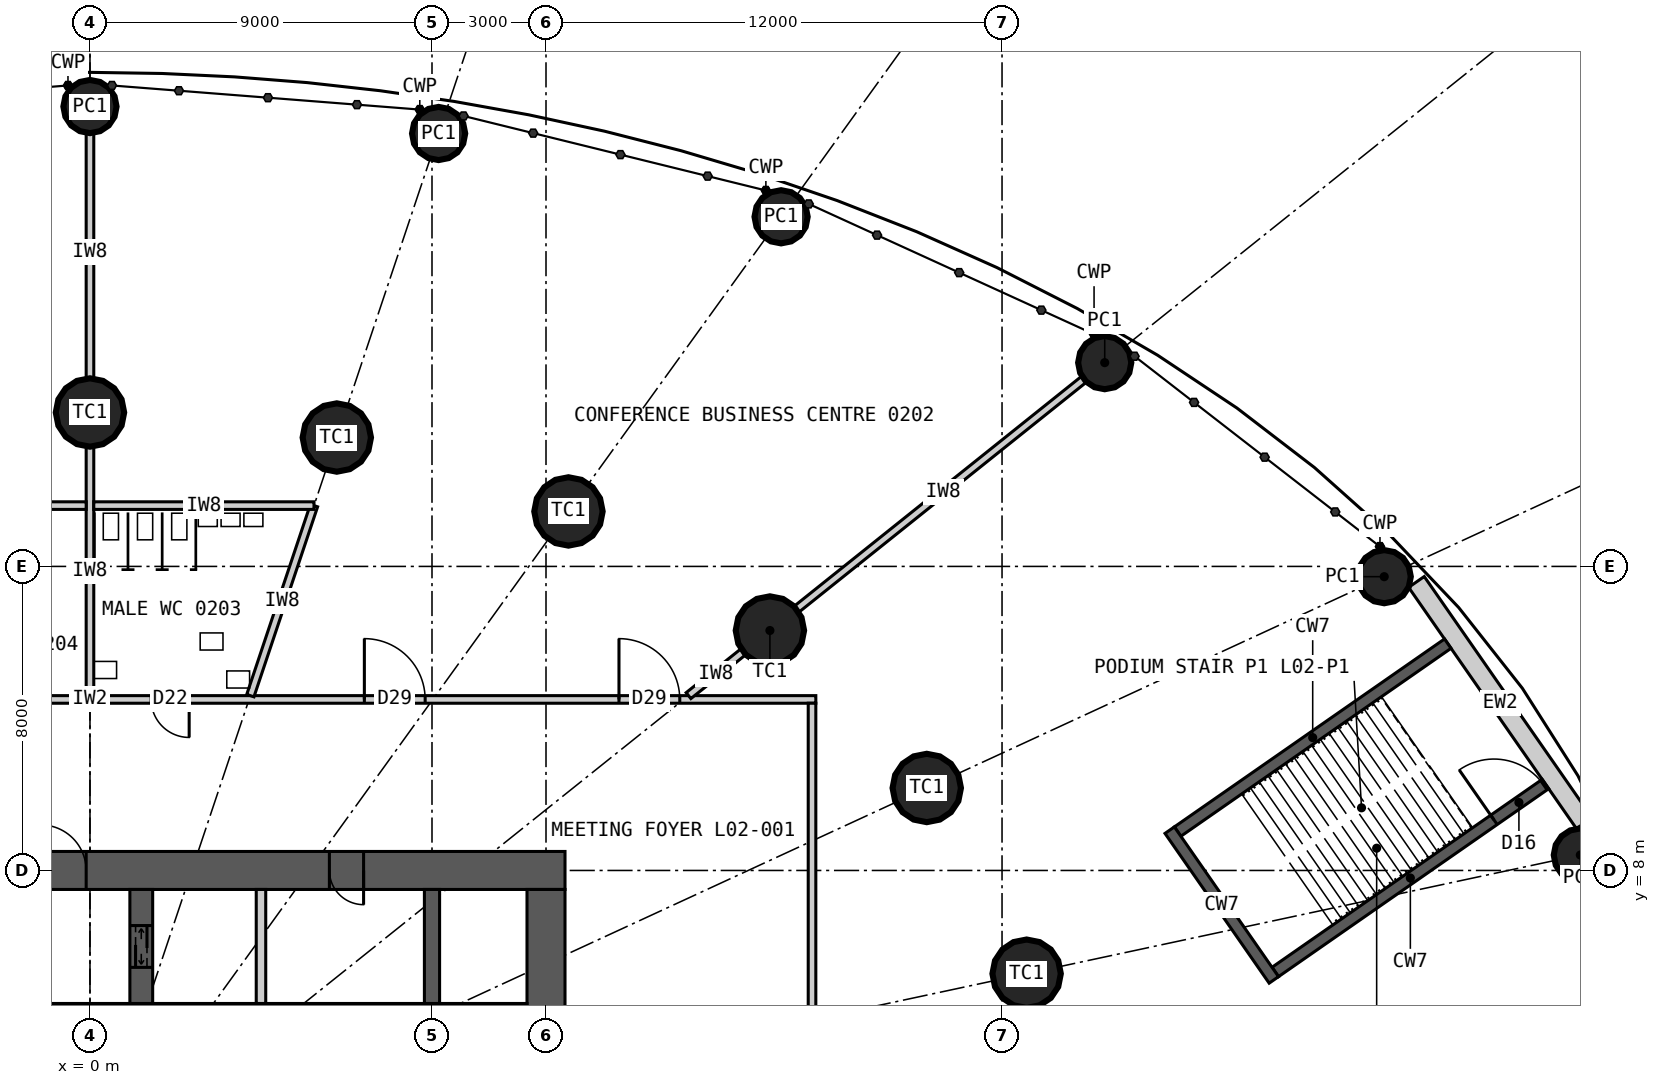
"""IFC4 building model, lengths in metres.
Left out: names, types, materials, properties, quantities, classifications, styles, units other than length and angle.
Written with IfcOpenShell. Run it as: python <this file> out.ifc"""

import sys

from ifc_helpers import new_model, si_unit, direction, frame, frame_2d, origin, origin_2d, place, context, subcontext, project, spatial, rectangle, circle, extrude, element, fill, save


model = new_model("IFC4")
c1 = context("Model", 3, precision=1e-05, world=origin(), true_north=direction((0.0, 1.0)))
c2 = subcontext(c1, "Body", "Model", "MODEL_VIEW")
j1 = project(units=[si_unit("LENGTHUNIT", "METRE"), si_unit("PLANEANGLEUNIT", "RADIAN")], contexts=[c1])
p1 = place(None, origin())
s1 = spatial("IfcSite", under=j1, at=p1, CompositionType="ELEMENT")
p2 = place(p1, origin())
s2 = spatial("IfcBuilding", under=s1, at=p2, CompositionType="ELEMENT")
p3 = place(p2, frame((0.0, 0.0, 13.8)))
s3 = spatial("IfcBuildingStorey", under=s2, at=p3, CompositionType="ELEMENT", Elevation=13.8)
for number, where, z_axis, x_axis in (
    (1, (24.647, 5.283, 0.0), (0.0, 0.0, 1.0), (1.0, 0.0, 0.0)),
    (2, (22.019, 10.17, 0.0), (0.0, 0.0, 1.0), (1.0, 0.0, 0.0)),
    (3, (17.892, 14.313, 0.0), (0.0, 0.0, 1.0), (1.0, 0.0, 0.0)),
    (4, (12.591, 17.447, 0.0), (0.0, 0.0, 1.0), (1.0, 0.0, 0.0)),
    (5, (6.495, 19.391, 0.0), (0.0, 0.0, 1.0), (1.0, 0.0, 0.0)),
    (6, (0.0, 20.05, 0.0), (0.0, 0.0, 1.0), (1.0, 0.0, 0.0)),
):
    element("IfcColumn", number, at=place(p3, frame(where, z_axis=z_axis, x_axis=x_axis)), inside=s3, PredefinedType="COLUMN", context=c2, shape_type="SweptSolid", body=[
        extrude(circle(Radius=0.9, at=origin_2d()), origin(), (0.0, 0.0, 1.0), 5.4),
    ])
for number, where, z_axis, x_axis in (
    (7, (39.218, 8.407, 0.0), (0.0, 0.0, 1.0), (1.0, 0.0, 0.0)),
    (8, (34.057, 15.73, 0.0), (0.0, 0.0, 1.0), (1.0, 0.0, 0.0)),
    (9, (26.702, 21.362, 0.0), (0.0, 0.0, 1.0), (1.0, 0.0, 0.0)),
    (10, (18.186, 25.199, 0.0), (0.0, 0.0, 1.0), (1.0, 0.0, 0.0)),
    (11, (9.174, 27.391, 0.0), (0.0, 0.0, 1.0), (1.0, 0.0, 0.0)),
    (12, (0.0, 28.1, 0.0), (0.0, 0.0, 1.0), (1.0, 0.0, 0.0)),
):
    element("IfcColumn", number, at=place(p3, frame(where, z_axis=z_axis, x_axis=x_axis)), inside=s3, PredefinedType="COLUMN", context=c2, shape_type="SweptSolid", body=[
        extrude(circle(Radius=0.7, at=origin_2d()), origin(), (0.0, 0.0, 1.0), 5.4),
    ])
p4 = place(p3, frame((-12.5, 8.0, 0.0), z_axis=(0.0, 0.0, 1.0), x_axis=(1.0, 0.0, 0.0)))
e13 = element("IfcWall", 13, at=p4, inside=s3, PredefinedType="SHEAR", context=c2, shape_type="SweptSolid", body=[
    extrude(rectangle(XDim=25.0, YDim=1.0, at=frame_2d((12.5, 0.0))), origin(), (0.0, 0.0, 1.0), 5.4),
])
p5 = place(p4, frame((11.2, 0.0, 0.0)))
e14 = element("IfcOpeningElement", 14, at=p5, cuts=e13, PredefinedType="OPENING", context=c2, shape_type="SweptSolid", body=[
    extrude(rectangle(XDim=1.2, YDim=2.2, at=frame_2d((0.6, 1.1))), frame((0.0, 0.51, 0.0), z_axis=(0.0, -1.0, 0.0), x_axis=(1.0, 0.0, 0.0)), (0.0, 0.0, 1.0), 1.02),
])
p6 = place(p4, frame((18.8, 0.0, 0.0)))
e15 = element("IfcOpeningElement", 15, at=p6, cuts=e13, PredefinedType="OPENING", context=c2, shape_type="SweptSolid", body=[
    extrude(rectangle(XDim=0.9, YDim=2.2, at=frame_2d((0.45, 1.1))), frame((0.0, 0.51, 0.0), z_axis=(0.0, -1.0, 0.0), x_axis=(1.0, 0.0, 0.0)), (0.0, 0.0, 1.0), 1.02),
])
p7 = place(p3, frame((12.0, -7.5, 0.0), z_axis=(0.0, 0.0, 1.0), x_axis=(0.0, 1.0, 0.0)))
e16 = element("IfcWall", 16, at=p7, inside=s3, PredefinedType="SHEAR", context=c2, shape_type="SweptSolid", body=[
    extrude(rectangle(XDim=15.0, YDim=1.0, at=frame_2d((7.5, 0.0))), origin(), (0.0, 0.0, 1.0), 5.4),
])
p8 = place(p7, frame((6.6, 0.0, 0.0)))
e17 = element("IfcOpeningElement", 17, at=p8, cuts=e16, PredefinedType="OPENING", context=c2, shape_type="SweptSolid", body=[
    extrude(rectangle(XDim=1.8, YDim=2.2, at=frame_2d((0.9, 1.1))), frame((0.0, 0.51, 0.0), z_axis=(0.0, -1.0, 0.0), x_axis=(1.0, 0.0, 0.0)), (0.0, 0.0, 1.0), 1.02),
])
p9 = place(p3, frame((-11.5, 4.3, 0.0), z_axis=(0.0, 0.0, 1.0), x_axis=(1.0, 0.0, 0.0)))
e18 = element("IfcWall", 18, at=p9, inside=s3, PredefinedType="SHEAR", context=c2, shape_type="SweptSolid", body=[
    extrude(rectangle(XDim=23.0, YDim=0.4, at=frame_2d((11.5, 0.0))), origin(), (0.0, 0.0, 1.0), 5.4),
])
p10 = place(p3, frame((9.0, 4.5, 0.0), z_axis=(0.0, 0.0, 1.0), x_axis=(0.0, 1.0, 0.0)))
e19 = element("IfcWall", 19, at=p10, inside=s3, PredefinedType="SHEAR", context=c2, shape_type="SweptSolid", body=[
    extrude(rectangle(XDim=3.0, YDim=0.4, at=frame_2d((1.5, 0.0))), origin(), (0.0, 0.0, 1.0), 5.4),
])
p11 = place(p3, frame((1.35, 4.5, 0.0), z_axis=(0.0, 0.0, 1.0), x_axis=(0.0, 1.0, 0.0)))
e20 = element("IfcWall", 20, at=p11, inside=s3, PredefinedType="SHEAR", context=c2, shape_type="SweptSolid", body=[
    extrude(rectangle(XDim=3.0, YDim=0.6, at=frame_2d((1.5, 0.0))), origin(), (0.0, 0.0, 1.0), 5.4),
])
p12 = place(p11, frame((0.95, 0.0, 0.0)))
e21 = element("IfcOpeningElement", 21, at=p12, cuts=e20, PredefinedType="OPENING", context=c2, shape_type="SweptSolid", body=[
    extrude(rectangle(XDim=1.1, YDim=2.2, at=frame_2d((0.55, 1.1))), frame((0.0, 0.31, 0.0), z_axis=(0.0, -1.0, 0.0), x_axis=(1.0, 0.0, 0.0)), (0.0, 0.0, 1.0), 0.62),
])
p13 = place(p3, frame((4.5, 4.5, 0.0), z_axis=(0.0, 0.0, 1.0), x_axis=(0.0, 1.0, 0.0)))
e22 = element("IfcWall", 22, at=p13, inside=s3, PredefinedType="PARTITIONING", context=c2, shape_type="SweptSolid", body=[
    extrude(rectangle(XDim=3.0, YDim=0.25, at=frame_2d((1.5, 0.0))), origin(), (0.0, 0.0, 1.0), 5.4),
])
p14 = place(p3, frame((39.32, 9.244, 0.0), z_axis=(0.0, 0.0, 1.0), x_axis=(-0.571029335057, 0.820929655028, 0.0)))
e23 = element("IfcWall", 23, at=p14, inside=s3, PredefinedType="SOLIDWALL", context=c2, shape_type="SweptSolid", body=[
    extrude(rectangle(XDim=7.733, YDim=0.5, at=frame_2d((3.866, 0.0))), origin(), (0.0, 0.0, 1.0), 5.15),
])
p15 = place(p3, frame((-19.1, 12.5, 0.0), z_axis=(0.0, 0.0, 1.0), x_axis=(1.0, 0.0, 0.0)))
e24 = element("IfcWall", 24, at=p15, inside=s3, PredefinedType="PARTITIONING", context=c2, shape_type="SweptSolid", body=[
    extrude(rectangle(XDim=38.2, YDim=0.2, at=frame_2d((19.1, 0.0))), origin(), (0.0, 0.0, 1.0), 5.15),
])
p16 = place(p15, frame((26.32, 0.0, 0.0)))
e25 = element("IfcOpeningElement", 25, at=p16, cuts=e24, PredefinedType="OPENING", context=c2, shape_type="SweptSolid", body=[
    extrude(rectangle(XDim=1.6, YDim=2.4, at=frame_2d((0.8, 1.2))), frame((0.0, 0.11, 0.0), z_axis=(0.0, -1.0, 0.0), x_axis=(1.0, 0.0, 0.0)), (0.0, 0.0, 1.0), 0.22),
])
p17 = place(p15, frame((20.71, 0.0, 0.0)))
e26 = element("IfcOpeningElement", 26, at=p17, cuts=e24, PredefinedType="OPENING", context=c2, shape_type="SweptSolid", body=[
    extrude(rectangle(XDim=1.0, YDim=2.1, at=frame_2d((0.5, 1.05))), frame((0.0, 0.11, 0.0), z_axis=(0.0, -1.0, 0.0), x_axis=(1.0, 0.0, 0.0)), (0.0, 0.0, 1.0), 0.22),
])
p18 = place(p15, frame((16.49, 0.0, 0.0)))
e27 = element("IfcOpeningElement", 27, at=p18, cuts=e24, PredefinedType="OPENING", context=c2, shape_type="SweptSolid", body=[
    extrude(rectangle(XDim=1.0, YDim=2.1, at=frame_2d((0.5, 1.05))), frame((0.0, 0.11, 0.0), z_axis=(0.0, -1.0, 0.0), x_axis=(1.0, 0.0, 0.0)), (0.0, 0.0, 1.0), 0.22),
])
p19 = place(p15, frame((11.943, 0.0, 0.0)))
e28 = element("IfcOpeningElement", 28, at=p19, cuts=e24, PredefinedType="OPENING", context=c2, shape_type="SweptSolid", body=[
    extrude(rectangle(XDim=1.0, YDim=2.2, at=frame_2d((0.5, 1.1))), frame((0.0, 0.11, 0.0), z_axis=(0.0, -1.0, 0.0), x_axis=(1.0, 0.0, 0.0)), (0.0, 0.0, 1.0), 0.22),
])
p20 = place(p15, frame((5.1, 0.0, 0.0)))
e29 = element("IfcOpeningElement", 29, at=p20, cuts=e24, PredefinedType="OPENING", context=c2, shape_type="SweptSolid", body=[
    extrude(rectangle(XDim=1.6, YDim=2.4, at=frame_2d((0.8, 1.2))), frame((0.0, 0.11, 0.0), z_axis=(0.0, -1.0, 0.0), x_axis=(1.0, 0.0, 0.0)), (0.0, 0.0, 1.0), 0.22),
])
p21 = place(p15, frame((33.02, 0.0, 0.0)))
e30 = element("IfcOpeningElement", 30, at=p21, cuts=e24, PredefinedType="OPENING", context=c2, shape_type="SweptSolid", body=[
    extrude(rectangle(XDim=1.6, YDim=2.4, at=frame_2d((0.8, 1.2))), frame((0.0, 0.11, 0.0), z_axis=(0.0, -1.0, 0.0), x_axis=(1.0, 0.0, 0.0)), (0.0, 0.0, 1.0), 0.22),
])
p22 = place(p3, frame((19.0, -12.4, 0.0), z_axis=(0.0, 0.0, 1.0), x_axis=(0.0, 1.0, 0.0)))
e31 = element("IfcWall", 31, at=p22, inside=s3, PredefinedType="PARTITIONING", context=c2, shape_type="SweptSolid", body=[
    extrude(rectangle(XDim=24.8, YDim=0.2, at=frame_2d((12.4, 0.0))), origin(), (0.0, 0.0, 1.0), 5.15),
])
p23 = place(p22, frame((11.5, 0.0, 0.0)))
e32 = element("IfcOpeningElement", 32, at=p23, cuts=e31, PredefinedType="OPENING", context=c2, shape_type="SweptSolid", body=[
    extrude(rectangle(XDim=1.8, YDim=2.4, at=frame_2d((0.9, 1.2))), frame((0.0, 0.11, 0.0), z_axis=(0.0, -1.0, 0.0), x_axis=(1.0, 0.0, 0.0)), (0.0, 0.0, 1.0), 0.22),
])
p24 = place(p3, frame((15.75, 12.6, 0.0), z_axis=(0.0, 0.0, 1.0), x_axis=(0.780881734892, 0.6246788904, 0.0)))
e33 = element("IfcWall", 33, at=p24, inside=s3, PredefinedType="PARTITIONING", context=c2, shape_type="SweptSolid", body=[
    extrude(rectangle(XDim=1.843, YDim=0.2, at=frame_2d((0.921, 0.0))), origin(), (0.0, 0.0, 1.0), 4.3),
])
p25 = place(p3, frame((18.594, 14.875, 0.0), z_axis=(0.0, 0.0, 1.0), x_axis=(0.780868809443, 0.624695047554, 0.0)))
e34 = element("IfcWall", 34, at=p25, inside=s3, PredefinedType="PARTITIONING", context=c2, shape_type="SweptSolid", body=[
    extrude(rectangle(XDim=9.883, YDim=0.2, at=frame_2d((4.941, 0.0))), origin(), (0.0, 0.0, 1.0), 4.25),
])
p26 = place(p3, frame((4.22, 12.6, 0.0), z_axis=(0.0, 0.0, 1.0), x_axis=(0.317574790206, 0.948233226915, 0.0)))
e35 = element("IfcWall", 35, at=p26, inside=s3, PredefinedType="PARTITIONING", context=c2, shape_type="SweptSolid", body=[
    extrude(rectangle(XDim=5.273, YDim=0.2, at=frame_2d((2.636, 0.0))), origin(), (0.0, 0.0, 1.0), 4.3),
])
p27 = place(p3, frame((0.0, 12.6, 0.0), z_axis=(0.0, 0.0, 1.0), x_axis=(0.0, 1.0, 0.0)))
e36 = element("IfcWall", 36, at=p27, inside=s3, PredefinedType="PARTITIONING", context=c2, shape_type="SweptSolid", body=[
    extrude(rectangle(XDim=6.55, YDim=0.2, at=frame_2d((3.275, 0.0))), origin(), (0.0, 0.0, 1.0), 4.3),
])
p28 = place(p3, frame((0.0, 20.95, 0.0), z_axis=(0.0, 0.0, 1.0), x_axis=(0.0, 1.0, 0.0)))
e37 = element("IfcWall", 37, at=p28, inside=s3, PredefinedType="PARTITIONING", context=c2, shape_type="SweptSolid", body=[
    extrude(rectangle(XDim=6.65, YDim=0.2, at=frame_2d((3.325, 0.0))), origin(), (0.0, 0.0, 1.0), 4.25),
])
p29 = place(p3, frame((38.299, 10.274, 0.0), z_axis=(0.0, 0.0, 1.0), x_axis=(-0.820936803751, -0.571019057692, 0.0)))
e38 = element("IfcWall", 38, at=p29, inside=s3, PredefinedType="SHEAR", context=c2, shape_type="SweptSolid", body=[
    extrude(rectangle(XDim=8.66, YDim=0.3, at=frame_2d((4.33, 0.0))), origin(), (0.0, 0.0, 1.0), 5.4),
])
p30 = place(p29, frame((0.05, 0.0, 0.0)))
e39 = element("IfcOpeningElement", 39, at=p30, cuts=e38, PredefinedType="OPENING", context=c2, shape_type="SweptSolid", body=[
    extrude(rectangle(XDim=1.6, YDim=2.1, at=frame_2d((0.8, 1.05))), frame((0.0, 0.16, 0.0), z_axis=(0.0, -1.0, 0.0), x_axis=(1.0, 0.0, 0.0)), (0.0, 0.0, 1.0), 0.32),
])
p31 = place(p3, frame((35.729, 13.968, 0.0), z_axis=(0.0, 0.0, 1.0), x_axis=(-0.82092761123, -0.571032273274, 0.0)))
e40 = element("IfcWall", 40, at=p31, inside=s3, PredefinedType="SHEAR", context=c2, shape_type="SweptSolid", body=[
    extrude(rectangle(XDim=8.66, YDim=0.3, at=frame_2d((4.33, 0.0))), origin(), (0.0, 0.0, 1.0), 5.4),
])
p32 = place(p3, frame((31.153, 5.12, 0.0), z_axis=(0.0, 0.0, 1.0), x_axis=(-0.571036173178, 0.820924898467, 0.0)))
e41 = element("IfcWall", 41, at=p32, inside=s3, PredefinedType="SHEAR", context=c2, shape_type="SweptSolid", body=[
    extrude(rectangle(XDim=4.8, YDim=0.3, at=frame_2d((2.4, 0.0))), origin(), (0.0, 0.0, 1.0), 5.4),
])
for number, where, z_axis, x_axis in (
    (42, (5.895, 17.6, 0.0), (0.0, 0.0, 1.0), (-1.0, 0.0, 0.0)),
    (43, (-0.1, 17.6, 0.0), (0.0, 0.0, 1.0), (-1.0, 0.0, 0.0)),
):
    element("IfcWall", number, at=place(p3, frame(where, z_axis=z_axis, x_axis=x_axis)), inside=s3, PredefinedType="PARTITIONING", context=c2, shape_type="SweptSolid", body=[
        extrude(rectangle(XDim=5.795, YDim=0.2, at=frame_2d((2.897, 0.0))), origin(), (0.0, 0.0, 1.0), 5.15),
    ])
p33 = place(p30, origin())
e44 = element("IfcDoor", 44, at=p33, inside=s3, OperationType="SINGLE_SWING_RIGHT", PredefinedType="DOOR", context=c2, shape_type="SweptSolid", body=[
    extrude(rectangle(XDim=1.6, YDim=2.1, at=frame_2d((0.8, 1.05))), frame((0.0, 0.025, 0.0), z_axis=(0.0, -1.0, 0.0), x_axis=(1.0, 0.0, 0.0)), (0.0, 0.0, 1.0), 0.05),
])
fill(e39, e44)
p34 = place(p16, origin())
e45 = element("IfcDoor", 45, at=p34, inside=s3, OperationType="DOUBLE_DOOR_DOUBLE_SWING", PredefinedType="DOOR", context=c2, shape_type="SweptSolid", body=[
    extrude(rectangle(XDim=1.6, YDim=2.4, at=frame_2d((0.8, 1.2))), frame((0.0, 0.025, 0.0), z_axis=(0.0, -1.0, 0.0), x_axis=(1.0, 0.0, 0.0)), (0.0, 0.0, 1.0), 0.05),
])
fill(e25, e45)
p35 = place(p17, origin())
e46 = element("IfcDoor", 46, at=p35, inside=s3, OperationType="SINGLE_SWING_RIGHT", PredefinedType="DOOR", context=c2, shape_type="SweptSolid", body=[
    extrude(rectangle(XDim=1.0, YDim=2.1, at=frame_2d((0.5, 1.05))), frame((0.0, 0.025, 0.0), z_axis=(0.0, -1.0, 0.0), x_axis=(1.0, 0.0, 0.0)), (0.0, 0.0, 1.0), 0.05),
])
fill(e26, e46)
p36 = place(p5, origin())
e47 = element("IfcDoor", 47, at=p36, inside=s3, OperationType="SINGLE_SWING_LEFT", PredefinedType="DOOR", context=c2, shape_type="SweptSolid", body=[
    extrude(rectangle(XDim=1.2, YDim=2.2, at=frame_2d((0.6, 1.1))), frame((0.0, 0.025, 0.0), z_axis=(0.0, -1.0, 0.0), x_axis=(1.0, 0.0, 0.0)), (0.0, 0.0, 1.0), 0.05),
])
fill(e14, e47)
p37 = place(p12, origin())
e48 = element("IfcDoor", 48, at=p37, inside=s3, OperationType="DOUBLE_DOOR_SLIDING", PredefinedType="DOOR", context=c2, shape_type="SweptSolid", body=[
    extrude(rectangle(XDim=1.1, YDim=2.2, at=frame_2d((0.55, 1.1))), frame((0.0, 0.025, 0.0), z_axis=(0.0, -1.0, 0.0), x_axis=(1.0, 0.0, 0.0)), (0.0, 0.0, 1.0), 0.05),
])
fill(e21, e48)
p38 = place(p6, origin())
e49 = element("IfcDoor", 49, at=p38, inside=s3, OperationType="SINGLE_SWING_RIGHT", PredefinedType="DOOR", context=c2, shape_type="SweptSolid", body=[
    extrude(rectangle(XDim=0.9, YDim=2.2, at=frame_2d((0.45, 1.1))), frame((0.0, 0.025, 0.0), z_axis=(0.0, -1.0, 0.0), x_axis=(1.0, 0.0, 0.0)), (0.0, 0.0, 1.0), 0.05),
])
fill(e15, e49)
p39 = place(p21, origin())
e50 = element("IfcDoor", 50, at=p39, inside=s3, OperationType="DOUBLE_DOOR_DOUBLE_SWING", PredefinedType="DOOR", context=c2, shape_type="SweptSolid", body=[
    extrude(rectangle(XDim=1.6, YDim=2.4, at=frame_2d((0.8, 1.2))), frame((0.0, 0.025, 0.0), z_axis=(0.0, -1.0, 0.0), x_axis=(1.0, 0.0, 0.0)), (0.0, 0.0, 1.0), 0.05),
])
fill(e30, e50)
save(model, sys.argv[1])
